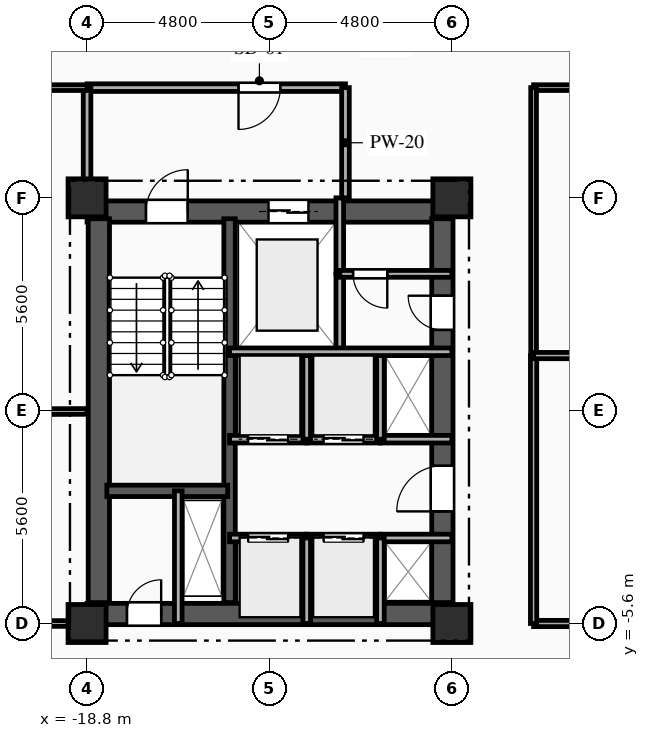
"""IFC4 building model, lengths in metres.
Left out: names, types, materials, properties, quantities, classifications, styles, units other than length and angle.
Written with IfcOpenShell. Run it as: python <this file> out.ifc"""

import sys

from ifc_helpers import new_model, si_unit, direction, frame, frame_2d, origin, origin_2d, place, context, subcontext, project, spatial, rectangle, extrude, element, fill, save


model = new_model("IFC4")
c1 = context("Model", 3, precision=1e-05, world=origin(), true_north=direction((0.0, 1.0)))
c2 = subcontext(c1, "Body", "Model", "MODEL_VIEW")
j1 = project(units=[si_unit("LENGTHUNIT", "METRE"), si_unit("PLANEANGLEUNIT", "RADIAN")], contexts=[c1])
p1 = place(None, origin())
s1 = spatial("IfcSite", under=j1, at=p1, CompositionType="ELEMENT")
p2 = place(p1, origin())
s2 = spatial("IfcBuilding", under=s1, at=p2, CompositionType="ELEMENT")
p3 = place(p2, frame((0.0, 0.0, 122.55)))
s3 = spatial("IfcBuildingStorey", under=s2, at=p3, CompositionType="ELEMENT", Elevation=122.55)
for number, where, z_axis, x_axis in (
    (1, (-18.8, -5.6, 0.0), (0.0, 0.0, 1.0), (1.0, 0.0, 0.0)),
    (2, (-18.8, 5.6, 0.0), (0.0, 0.0, 1.0), (1.0, 0.0, 0.0)),
    (3, (-9.2, -5.6, 0.0), (0.0, 0.0, 1.0), (1.0, 0.0, 0.0)),
    (4, (-9.2, 5.6, 0.0), (0.0, 0.0, 1.0), (1.0, 0.0, 0.0)),
):
    element("IfcColumn", number, at=place(p3, frame(where, z_axis=z_axis, x_axis=x_axis)), inside=s3, PredefinedType="COLUMN", context=c2, shape_type="SweptSolid", body=[
        extrude(rectangle(XDim=1.0, YDim=1.0, at=origin_2d()), origin(), (0.0, 0.0, 1.0), 3.35),
    ])
p4 = place(p3, frame((-18.8, 5.24, 0.0), z_axis=(0.0, 0.0, 1.0), x_axis=(1.0, 0.0, 0.0)))
e5 = element("IfcWall", 5, at=p4, inside=s3, PredefinedType="SHEAR", context=c2, shape_type="SweptSolid", body=[
    extrude(rectangle(XDim=9.6, YDim=0.56, at=frame_2d((4.8, 0.0))), origin(), (0.0, 0.0, 1.0), 3.0),
])
p5 = place(p4, frame((1.55, 0.0, 0.0)))
e6 = element("IfcOpeningElement", 6, at=p5, cuts=e5, PredefinedType="OPENING", context=c2, shape_type="SweptSolid", body=[
    extrude(rectangle(XDim=1.1, YDim=2.15, at=frame_2d((0.55, 1.075))), frame((0.0, 0.29, 0.0), z_axis=(0.0, -1.0, 0.0), x_axis=(1.0, 0.0, 0.0)), (0.0, 0.0, 1.0), 0.58),
])
p6 = place(p4, frame((4.775, 0.0, 0.0)))
e7 = element("IfcOpeningElement", 7, at=p6, cuts=e5, PredefinedType="OPENING", context=c2, shape_type="SweptSolid", body=[
    extrude(rectangle(XDim=1.05, YDim=2.1, at=frame_2d((0.525, 1.05))), frame((0.0, 0.29, 0.0), z_axis=(0.0, -1.0, 0.0), x_axis=(1.0, 0.0, 0.0)), (0.0, 0.0, 1.0), 0.58),
])
p7 = place(p3, frame((-18.8, -5.35, 0.0), z_axis=(0.0, 0.0, 1.0), x_axis=(1.0, 0.0, 0.0)))
e8 = element("IfcWall", 8, at=p7, inside=s3, PredefinedType="SHEAR", context=c2, shape_type="SweptSolid", body=[
    extrude(rectangle(XDim=9.6, YDim=0.56, at=frame_2d((4.8, 0.0))), origin(), (0.0, 0.0, 1.0), 3.0),
])
p8 = place(p7, frame((1.05, 0.0, 0.0)))
e9 = element("IfcOpeningElement", 9, at=p8, cuts=e8, PredefinedType="OPENING", context=c2, shape_type="SweptSolid", body=[
    extrude(rectangle(XDim=0.9, YDim=2.1, at=frame_2d((0.45, 1.05))), frame((0.0, 0.29, 0.0), z_axis=(0.0, -1.0, 0.0), x_axis=(1.0, 0.0, 0.0)), (0.0, 0.0, 1.0), 0.58),
])
p9 = place(p3, frame((-18.49, -5.05, 0.0), z_axis=(0.0, 0.0, 1.0), x_axis=(0.0, 1.0, 0.0)))
e10 = element("IfcWall", 10, at=p9, inside=s3, PredefinedType="SHEAR", context=c2, shape_type="SweptSolid", body=[
    extrude(rectangle(XDim=10.1, YDim=0.56, at=frame_2d((5.05, 0.0))), origin(), (0.0, 0.0, 1.0), 3.0),
])
p10 = place(p3, frame((-9.45, -5.05, 0.0), z_axis=(0.0, 0.0, 1.0), x_axis=(0.0, 1.0, 0.0)))
e11 = element("IfcWall", 11, at=p10, inside=s3, PredefinedType="SHEAR", context=c2, shape_type="SweptSolid", body=[
    extrude(rectangle(XDim=10.1, YDim=0.56, at=frame_2d((5.05, 0.0))), origin(), (0.0, 0.0, 1.0), 3.0),
])
p11 = place(p10, frame((7.175, 0.0, 0.0)))
e12 = element("IfcOpeningElement", 12, at=p11, cuts=e11, PredefinedType="OPENING", context=c2, shape_type="SweptSolid", body=[
    extrude(rectangle(XDim=0.9, YDim=2.1, at=frame_2d((0.45, 1.05))), frame((0.0, 0.29, 0.0), z_axis=(0.0, -1.0, 0.0), x_axis=(1.0, 0.0, 0.0)), (0.0, 0.0, 1.0), 0.58),
])
p12 = place(p10, frame((2.4, 0.0, 0.0)))
e13 = element("IfcOpeningElement", 13, at=p12, cuts=e11, PredefinedType="OPENING", context=c2, shape_type="SweptSolid", body=[
    extrude(rectangle(XDim=1.2, YDim=2.15, at=frame_2d((0.6, 1.075))), frame((0.0, 0.29, 0.0), z_axis=(0.0, -1.0, 0.0), x_axis=(1.0, 0.0, 0.0)), (0.0, 0.0, 1.0), 0.58),
])
p13 = place(p3, frame((-15.05, -5.05, 0.0), z_axis=(0.0, 0.0, 1.0), x_axis=(0.0, 1.0, 0.0)))
e14 = element("IfcWall", 14, at=p13, inside=s3, PredefinedType="SHEAR", context=c2, shape_type="SweptSolid", body=[
    extrude(rectangle(XDim=10.1, YDim=0.3, at=frame_2d((5.05, 0.0))), origin(), (0.0, 0.0, 1.0), 3.0),
])
p14 = place(p3, frame((-18.28, -2.11, 0.0), z_axis=(0.0, 0.0, 1.0), x_axis=(1.0, 0.0, 0.0)))
e15 = element("IfcWall", 15, at=p14, inside=s3, PredefinedType="SHEAR", context=c2, shape_type="SweptSolid", body=[
    extrude(rectangle(XDim=3.18, YDim=0.3, at=frame_2d((1.59, 0.0))), origin(), (0.0, 0.0, 1.0), 3.0),
])
p15 = place(p3, frame((-16.4, -5.6, 0.0), z_axis=(0.0, 0.0, 1.0), x_axis=(0.0, 1.0, 0.0)))
e16 = element("IfcWall", 16, at=p15, inside=s3, PredefinedType="PARTITIONING", context=c2, shape_type="SweptSolid", body=[
    extrude(rectangle(XDim=3.49, YDim=0.2, at=frame_2d((1.745, 0.0))), origin(), (0.0, 0.0, 1.0), 3.0),
])
p16 = place(p3, frame((-12.15, 1.55, 0.0), z_axis=(0.0, 0.0, 1.0), x_axis=(0.0, 1.0, 0.0)))
e17 = element("IfcWall", 17, at=p16, inside=s3, PredefinedType="PARTITIONING", context=c2, shape_type="SweptSolid", body=[
    extrude(rectangle(XDim=2.05, YDim=0.2, at=frame_2d((1.025, 0.0))), origin(), (0.0, 0.0, 1.0), 3.0),
])
p17 = place(p3, frame((-12.15, 3.6, 0.0), z_axis=(0.0, 0.0, 1.0), x_axis=(0.0, 1.0, 0.0)))
e18 = element("IfcWall", 18, at=p17, inside=s3, PredefinedType="PARTITIONING", context=c2, shape_type="SweptSolid", body=[
    extrude(rectangle(XDim=2.0, YDim=0.2, at=frame_2d((1.0, 0.0))), origin(), (0.0, 0.0, 1.0), 3.0),
])
p18 = place(p3, frame((-12.0, 8.5, 0.0), z_axis=(0.0, 0.0, 1.0), x_axis=(-1.0, 0.0, 0.0)))
e19 = element("IfcWall", 19, at=p18, inside=s3, PredefinedType="PARTITIONING", context=c2, shape_type="SweptSolid", body=[
    extrude(rectangle(XDim=6.8, YDim=0.2, at=frame_2d((3.4, 0.0))), origin(), (0.0, 0.0, 1.0), 3.0),
])
p19 = place(p18, frame((1.715, 0.0, 0.0)))
e20 = element("IfcOpeningElement", 20, at=p19, cuts=e19, PredefinedType="OPENING", context=c2, shape_type="SweptSolid", body=[
    extrude(rectangle(XDim=1.1, YDim=2.15, at=frame_2d((0.55, 1.075))), frame((0.0, 0.11, 0.0), z_axis=(0.0, -1.0, 0.0), x_axis=(1.0, 0.0, 0.0)), (0.0, 0.0, 1.0), 0.22),
])
p20 = place(p3, frame((-12.0, 5.6, 0.0), z_axis=(0.0, 0.0, 1.0), x_axis=(0.0, 1.0, 0.0)))
e21 = element("IfcWall", 21, at=p20, inside=s3, PredefinedType="PARTITIONING", context=c2, shape_type="SweptSolid", body=[
    extrude(rectangle(XDim=2.9, YDim=0.2, at=frame_2d((1.45, 0.0))), origin(), (0.0, 0.0, 1.0), 3.0),
])
p21 = place(p3, frame((-18.8, 8.5, 0.0), z_axis=(0.0, 0.0, 1.0), x_axis=(0.0, -1.0, 0.0)))
e22 = element("IfcWall", 22, at=p21, inside=s3, PredefinedType="PARTITIONING", context=c2, shape_type="SweptSolid", body=[
    extrude(rectangle(XDim=2.9, YDim=0.2, at=frame_2d((1.45, 0.0))), origin(), (0.0, 0.0, 1.0), 2.485),
])
p22 = place(p3, frame((-9.2, 3.6, 0.0), z_axis=(0.0, 0.0, 1.0), x_axis=(-1.0, 0.0, 0.0)))
e23 = element("IfcWall", 23, at=p22, inside=s3, PredefinedType="PARTITIONING", context=c2, shape_type="SweptSolid", body=[
    extrude(rectangle(XDim=2.95, YDim=0.18, at=frame_2d((1.475, 0.0))), origin(), (0.0, 0.0, 1.0), 3.0),
])
p23 = place(p22, frame((1.7, 0.0, 0.0)))
e24 = element("IfcOpeningElement", 24, at=p23, cuts=e23, PredefinedType="OPENING", context=c2, shape_type="SweptSolid", body=[
    extrude(rectangle(XDim=0.9, YDim=2.1, at=frame_2d((0.45, 1.05))), frame((0.0, 0.1, 0.0), z_axis=(0.0, -1.0, 0.0), x_axis=(1.0, 0.0, 0.0)), (0.0, 0.0, 1.0), 0.2),
])
p24 = place(p3, frame((-15.05, -3.35, 0.0), z_axis=(0.0, 0.0, 1.0), x_axis=(1.0, 0.0, 0.0)))
e25 = element("IfcWall", 25, at=p24, inside=s3, PredefinedType="PARTITIONING", context=c2, shape_type="SweptSolid", body=[
    extrude(rectangle(XDim=2.03, YDim=0.2, at=frame_2d((1.015, 0.0))), origin(), (0.0, 0.0, 1.0), 3.0),
])
p25 = place(p24, frame((0.49, 0.0, 0.0)))
e26 = element("IfcOpeningElement", 26, at=p25, cuts=e25, PredefinedType="OPENING", context=c2, shape_type="SweptSolid", body=[
    extrude(rectangle(XDim=1.05, YDim=2.1, at=frame_2d((0.525, 1.05))), frame((0.0, 0.11, 0.0), z_axis=(0.0, -1.0, 0.0), x_axis=(1.0, 0.0, 0.0)), (0.0, 0.0, 1.0), 0.22),
])
p26 = place(p3, frame((-13.02, -3.35, 0.0), z_axis=(0.0, 0.0, 1.0), x_axis=(1.0, 0.0, 0.0)))
e27 = element("IfcWall", 27, at=p26, inside=s3, PredefinedType="PARTITIONING", context=c2, shape_type="SweptSolid", body=[
    extrude(rectangle(XDim=1.94, YDim=0.2, at=frame_2d((0.97, 0.0))), origin(), (0.0, 0.0, 1.0), 3.0),
])
p27 = place(p26, frame((0.445, 0.0, 0.0)))
e28 = element("IfcOpeningElement", 28, at=p27, cuts=e27, PredefinedType="OPENING", context=c2, shape_type="SweptSolid", body=[
    extrude(rectangle(XDim=1.05, YDim=2.1, at=frame_2d((0.525, 1.05))), frame((0.0, 0.11, 0.0), z_axis=(0.0, -1.0, 0.0), x_axis=(1.0, 0.0, 0.0)), (0.0, 0.0, 1.0), 0.22),
])
p28 = place(p3, frame((-11.08, -3.35, 0.0), z_axis=(0.0, 0.0, 1.0), x_axis=(1.0, 0.0, 0.0)))
e29 = element("IfcWall", 29, at=p28, inside=s3, PredefinedType="PARTITIONING", context=c2, shape_type="SweptSolid", body=[
    extrude(rectangle(XDim=1.88, YDim=0.2, at=frame_2d((0.94, 0.0))), origin(), (0.0, 0.0, 1.0), 2.715),
])
p29 = place(p3, frame((-13.02, -0.75, 0.0), z_axis=(0.0, 0.0, 1.0), x_axis=(-1.0, 0.0, 0.0)))
e30 = element("IfcWall", 30, at=p29, inside=s3, PredefinedType="PARTITIONING", context=c2, shape_type="SweptSolid", body=[
    extrude(rectangle(XDim=2.03, YDim=0.2, at=frame_2d((1.015, 0.0))), origin(), (0.0, 0.0, 1.0), 3.0),
])
p30 = place(p29, frame((0.49, 0.0, 0.0)))
e31 = element("IfcOpeningElement", 31, at=p30, cuts=e30, PredefinedType="OPENING", context=c2, shape_type="SweptSolid", body=[
    extrude(rectangle(XDim=1.05, YDim=2.1, at=frame_2d((0.525, 1.05))), frame((0.0, 0.11, 0.0), z_axis=(0.0, -1.0, 0.0), x_axis=(1.0, 0.0, 0.0)), (0.0, 0.0, 1.0), 0.22),
])
p31 = place(p3, frame((-11.08, -0.75, 0.0), z_axis=(0.0, 0.0, 1.0), x_axis=(-1.0, 0.0, 0.0)))
e32 = element("IfcWall", 32, at=p31, inside=s3, PredefinedType="PARTITIONING", context=c2, shape_type="SweptSolid", body=[
    extrude(rectangle(XDim=1.94, YDim=0.2, at=frame_2d((0.97, 0.0))), origin(), (0.0, 0.0, 1.0), 3.0),
])
p32 = place(p31, frame((0.445, 0.0, 0.0)))
e33 = element("IfcOpeningElement", 33, at=p32, cuts=e32, PredefinedType="OPENING", context=c2, shape_type="SweptSolid", body=[
    extrude(rectangle(XDim=1.05, YDim=2.1, at=frame_2d((0.525, 1.05))), frame((0.0, 0.11, 0.0), z_axis=(0.0, -1.0, 0.0), x_axis=(1.0, 0.0, 0.0)), (0.0, 0.0, 1.0), 0.22),
])
p33 = place(p3, frame((-9.2, -0.75, 0.0), z_axis=(0.0, 0.0, 1.0), x_axis=(-1.0, 0.0, 0.0)))
e34 = element("IfcWall", 34, at=p33, inside=s3, PredefinedType="PARTITIONING", context=c2, shape_type="SweptSolid", body=[
    extrude(rectangle(XDim=1.88, YDim=0.2, at=frame_2d((0.94, 0.0))), origin(), (0.0, 0.0, 1.0), 3.0),
])
for number, where, z_axis, x_axis in (
    (35, (-13.02, -5.6, 0.0), (0.0, 0.0, 1.0), (0.0, 1.0, 0.0)),
    (36, (-11.08, -5.6, 0.0), (0.0, 0.0, 1.0), (0.0, 1.0, 0.0)),
):
    element("IfcWall", number, at=place(p3, frame(where, z_axis=z_axis, x_axis=x_axis)), inside=s3, PredefinedType="PARTITIONING", context=c2, shape_type="SweptSolid", body=[
        extrude(rectangle(XDim=2.25, YDim=0.2, at=frame_2d((1.125, 0.0))), origin(), (0.0, 0.0, 1.0), 3.0),
    ])
for number, where, z_axis, x_axis in (
    (37, (-13.02, -0.75, 0.0), (0.0, 0.0, 1.0), (0.0, 1.0, 0.0)),
    (38, (-11.08, -0.75, 0.0), (0.0, 0.0, 1.0), (0.0, 1.0, 0.0)),
):
    element("IfcWall", number, at=place(p3, frame(where, z_axis=z_axis, x_axis=x_axis)), inside=s3, PredefinedType="PARTITIONING", context=c2, shape_type="SweptSolid", body=[
        extrude(rectangle(XDim=2.3, YDim=0.2, at=frame_2d((1.15, 0.0))), origin(), (0.0, 0.0, 1.0), 3.0),
    ])
p34 = place(p3, frame((-18.8, 8.5, 0.0), z_axis=(0.0, 0.0, 1.0), x_axis=(-1.0, 0.0, 0.0)))
e39 = element("IfcWall", 39, at=p34, inside=s3, PredefinedType="PARTITIONING", context=c2, shape_type="SweptSolid", body=[
    extrude(rectangle(XDim=4.2, YDim=0.15, at=frame_2d((2.1, 0.0))), origin(), (0.0, 0.0, 1.0), 3.0),
])
p35 = place(p34, frame((2.321, 0.0, 0.0)))
e40 = element("IfcOpeningElement", 40, at=p35, cuts=e39, PredefinedType="OPENING", context=c2, shape_type="SweptSolid", body=[
    extrude(rectangle(XDim=1.05, YDim=2.15, at=frame_2d((0.525, 1.075))), frame((0.0, 0.085, 0.0), z_axis=(0.0, -1.0, 0.0), x_axis=(1.0, 0.0, 0.0)), (0.0, 0.0, 1.0), 0.17),
])
p36 = place(p3, frame((0.0, 8.5, 0.0), z_axis=(0.0, 0.0, 1.0), x_axis=(-1.0, 0.0, 0.0)))
e41 = element("IfcWall", 41, at=p36, inside=s3, PredefinedType="PARTITIONING", context=c2, shape_type="SweptSolid", body=[
    extrude(rectangle(XDim=7.05, YDim=0.15, at=frame_2d((3.525, 0.0))), origin(), (0.0, 0.0, 1.0), 3.0),
])
p37 = place(p36, frame((1.185, 0.0, 0.0)))
e42 = element("IfcOpeningElement", 42, at=p37, cuts=e41, PredefinedType="OPENING", context=c2, shape_type="SweptSolid", body=[
    extrude(rectangle(XDim=1.05, YDim=2.15, at=frame_2d((0.525, 1.075))), frame((0.0, 0.085, 0.0), z_axis=(0.0, -1.0, 0.0), x_axis=(1.0, 0.0, 0.0)), (0.0, 0.0, 1.0), 0.17),
])
p38 = place(p3, frame((-23.0, -5.6, 0.0), z_axis=(0.0, 0.0, 1.0), x_axis=(1.0, 0.0, 0.0)))
e43 = element("IfcWall", 43, at=p38, inside=s3, PredefinedType="PARTITIONING", context=c2, shape_type="SweptSolid", body=[
    extrude(rectangle(XDim=4.2, YDim=0.15, at=frame_2d((2.1, 0.0))), origin(), (0.0, 0.0, 1.0), 3.0),
])
p39 = place(p38, frame((0.829, 0.0, 0.0)))
e44 = element("IfcOpeningElement", 44, at=p39, cuts=e43, PredefinedType="OPENING", context=c2, shape_type="SweptSolid", body=[
    extrude(rectangle(XDim=1.05, YDim=2.15, at=frame_2d((0.525, 1.075))), frame((0.0, 0.085, 0.0), z_axis=(0.0, -1.0, 0.0), x_axis=(1.0, 0.0, 0.0)), (0.0, 0.0, 1.0), 0.17),
])
p40 = place(p3, frame((-7.05, -5.6, 0.0), z_axis=(0.0, 0.0, 1.0), x_axis=(1.0, 0.0, 0.0)))
e45 = element("IfcWall", 45, at=p40, inside=s3, PredefinedType="PARTITIONING", context=c2, shape_type="SweptSolid", body=[
    extrude(rectangle(XDim=7.05, YDim=0.165, at=frame_2d((3.525, 0.0))), origin(), (0.0, 0.0, 1.0), 2.485),
])
p41 = place(p40, frame((4.728, 0.0, 0.0)))
e46 = element("IfcOpeningElement", 46, at=p41, cuts=e45, PredefinedType="OPENING", context=c2, shape_type="SweptSolid", body=[
    extrude(rectangle(XDim=1.15, YDim=2.15, at=frame_2d((0.575, 1.075))), frame((0.0, 0.093, 0.0), z_axis=(0.0, -1.0, 0.0), x_axis=(1.0, 0.0, 0.0)), (0.0, 0.0, 1.0), 0.185),
])
p42 = place(p3, frame((-7.05, 1.45, 0.0), z_axis=(0.0, 0.0, 1.0), x_axis=(0.0, -1.0, 0.0)))
e47 = element("IfcWall", 47, at=p42, inside=s3, PredefinedType="PARTITIONING", context=c2, shape_type="SweptSolid", body=[
    extrude(rectangle(XDim=7.05, YDim=0.165, at=frame_2d((3.525, 0.0))), origin(), (0.0, 0.0, 1.0), 3.0),
])
p43 = place(p3, frame((-7.05, 8.5, 0.0), z_axis=(0.0, 0.0, 1.0), x_axis=(0.0, -1.0, 0.0)))
e48 = element("IfcWall", 48, at=p43, inside=s3, PredefinedType="PARTITIONING", context=c2, shape_type="SweptSolid", body=[
    extrude(rectangle(XDim=7.05, YDim=0.15, at=frame_2d((3.525, 0.0))), origin(), (0.0, 0.0, 1.0), 3.0),
])
p44 = place(p3, frame((-28.671, -0.064, 0.0), z_axis=(0.0, 0.0, 1.0), x_axis=(0.999990089865, 0.004451985263, 0.0)))
e49 = element("IfcWall", 49, at=p44, inside=s3, PredefinedType="PARTITIONING", context=c2, shape_type="SweptSolid", body=[
    extrude(rectangle(XDim=9.871, YDim=0.15, at=frame_2d((4.936, 0.0))), origin(), (0.0, 0.0, 1.0), 3.0),
])
p45 = place(p3, frame((-7.05, 1.45, 0.0), z_axis=(0.0, 0.0, 1.0), x_axis=(1.0, 0.0, 0.0)))
e50 = element("IfcWall", 50, at=p45, inside=s3, PredefinedType="PARTITIONING", context=c2, shape_type="SweptSolid", body=[
    extrude(rectangle(XDim=14.1, YDim=0.165, at=frame_2d((7.05, 0.0))), origin(), (0.0, 0.0, 1.0), 3.0),
])
p46 = place(p3, frame((-15.05, 1.55, 0.0), z_axis=(0.0, 0.0, 1.0), x_axis=(1.0, 0.0, 0.0)))
e51 = element("IfcWall", 51, at=p46, inside=s3, PredefinedType="PARTITIONING", context=c2, shape_type="SweptSolid", body=[
    extrude(rectangle(XDim=5.85, YDim=0.2, at=frame_2d((2.925, 0.0))), origin(), (0.0, 0.0, 1.0), 3.0),
])
p47 = place(p5, origin())
e52 = element("IfcDoor", 52, at=p47, inside=s3, OperationType="SINGLE_SWING_RIGHT", PredefinedType="DOOR", context=c2, shape_type="SweptSolid", body=[
    extrude(rectangle(XDim=1.1, YDim=2.15, at=frame_2d((0.55, 1.075))), frame((0.0, 0.025, 0.0), z_axis=(0.0, -1.0, 0.0), x_axis=(1.0, 0.0, 0.0)), (0.0, 0.0, 1.0), 0.05),
])
fill(e6, e52)
p48 = place(p6, origin())
e53 = element("IfcDoor", 53, at=p48, inside=s3, OperationType="DOUBLE_DOOR_SLIDING", PredefinedType="DOOR", context=c2, shape_type="SweptSolid", body=[
    extrude(rectangle(XDim=1.05, YDim=2.1, at=frame_2d((0.525, 1.05))), frame((0.0, 0.025, 0.0), z_axis=(0.0, -1.0, 0.0), x_axis=(1.0, 0.0, 0.0)), (0.0, 0.0, 1.0), 0.05),
])
fill(e7, e53)
p49 = place(p8, origin())
e54 = element("IfcDoor", 54, at=p49, inside=s3, OperationType="SINGLE_SWING_RIGHT", PredefinedType="DOOR", context=c2, shape_type="SweptSolid", body=[
    extrude(rectangle(XDim=0.9, YDim=2.1, at=frame_2d((0.45, 1.05))), frame((0.0, 0.025, 0.0), z_axis=(0.0, -1.0, 0.0), x_axis=(1.0, 0.0, 0.0)), (0.0, 0.0, 1.0), 0.05),
])
fill(e9, e54)
p50 = place(p19, origin())
e55 = element("IfcDoor", 55, at=p50, inside=s3, OperationType="SINGLE_SWING_RIGHT", PredefinedType="DOOR", context=c2, shape_type="SweptSolid", body=[
    extrude(rectangle(XDim=1.1, YDim=2.15, at=frame_2d((0.55, 1.075))), frame((0.0, 0.025, 0.0), z_axis=(0.0, -1.0, 0.0), x_axis=(1.0, 0.0, 0.0)), (0.0, 0.0, 1.0), 0.05),
])
fill(e20, e55)
p51 = place(p23, origin())
e56 = element("IfcDoor", 56, at=p51, inside=s3, OperationType="SINGLE_SWING_LEFT", PredefinedType="DOOR", context=c2, shape_type="SweptSolid", body=[
    extrude(rectangle(XDim=0.9, YDim=2.1, at=frame_2d((0.45, 1.05))), frame((0.0, 0.025, 0.0), z_axis=(0.0, -1.0, 0.0), x_axis=(1.0, 0.0, 0.0)), (0.0, 0.0, 1.0), 0.05),
])
fill(e24, e56)
p52 = place(p11, origin())
e57 = element("IfcDoor", 57, at=p52, inside=s3, OperationType="SINGLE_SWING_RIGHT", PredefinedType="DOOR", context=c2, shape_type="SweptSolid", body=[
    extrude(rectangle(XDim=0.9, YDim=2.1, at=frame_2d((0.45, 1.05))), frame((0.0, 0.025, 0.0), z_axis=(0.0, -1.0, 0.0), x_axis=(1.0, 0.0, 0.0)), (0.0, 0.0, 1.0), 0.05),
])
fill(e12, e57)
p53 = place(p25, origin())
e58 = element("IfcDoor", 58, at=p53, inside=s3, OperationType="DOUBLE_DOOR_SLIDING", PredefinedType="DOOR", context=c2, shape_type="SweptSolid", body=[
    extrude(rectangle(XDim=1.05, YDim=2.1, at=frame_2d((0.525, 1.05))), frame((0.0, 0.025, 0.0), z_axis=(0.0, -1.0, 0.0), x_axis=(1.0, 0.0, 0.0)), (0.0, 0.0, 1.0), 0.05),
])
fill(e26, e58)
p54 = place(p27, origin())
e59 = element("IfcDoor", 59, at=p54, inside=s3, OperationType="DOUBLE_DOOR_SLIDING", PredefinedType="DOOR", context=c2, shape_type="SweptSolid", body=[
    extrude(rectangle(XDim=1.05, YDim=2.1, at=frame_2d((0.525, 1.05))), frame((0.0, 0.025, 0.0), z_axis=(0.0, -1.0, 0.0), x_axis=(1.0, 0.0, 0.0)), (0.0, 0.0, 1.0), 0.05),
])
fill(e28, e59)
p55 = place(p30, origin())
e60 = element("IfcDoor", 60, at=p55, inside=s3, OperationType="DOUBLE_DOOR_SLIDING", PredefinedType="DOOR", context=c2, shape_type="SweptSolid", body=[
    extrude(rectangle(XDim=1.05, YDim=2.1, at=frame_2d((0.525, 1.05))), frame((0.0, 0.025, 0.0), z_axis=(0.0, -1.0, 0.0), x_axis=(1.0, 0.0, 0.0)), (0.0, 0.0, 1.0), 0.05),
])
fill(e31, e60)
p56 = place(p32, origin())
e61 = element("IfcDoor", 61, at=p56, inside=s3, OperationType="DOUBLE_DOOR_SLIDING", PredefinedType="DOOR", context=c2, shape_type="SweptSolid", body=[
    extrude(rectangle(XDim=1.05, YDim=2.1, at=frame_2d((0.525, 1.05))), frame((0.0, 0.025, 0.0), z_axis=(0.0, -1.0, 0.0), x_axis=(1.0, 0.0, 0.0)), (0.0, 0.0, 1.0), 0.05),
])
fill(e33, e61)
p57 = place(p12, origin())
e62 = element("IfcDoor", 62, at=p57, inside=s3, OperationType="SINGLE_SWING_LEFT", PredefinedType="DOOR", context=c2, shape_type="SweptSolid", body=[
    extrude(rectangle(XDim=1.2, YDim=2.15, at=frame_2d((0.6, 1.075))), frame((0.0, 0.025, 0.0), z_axis=(0.0, -1.0, 0.0), x_axis=(1.0, 0.0, 0.0)), (0.0, 0.0, 1.0), 0.05),
])
fill(e13, e62)
save(model, sys.argv[1])
